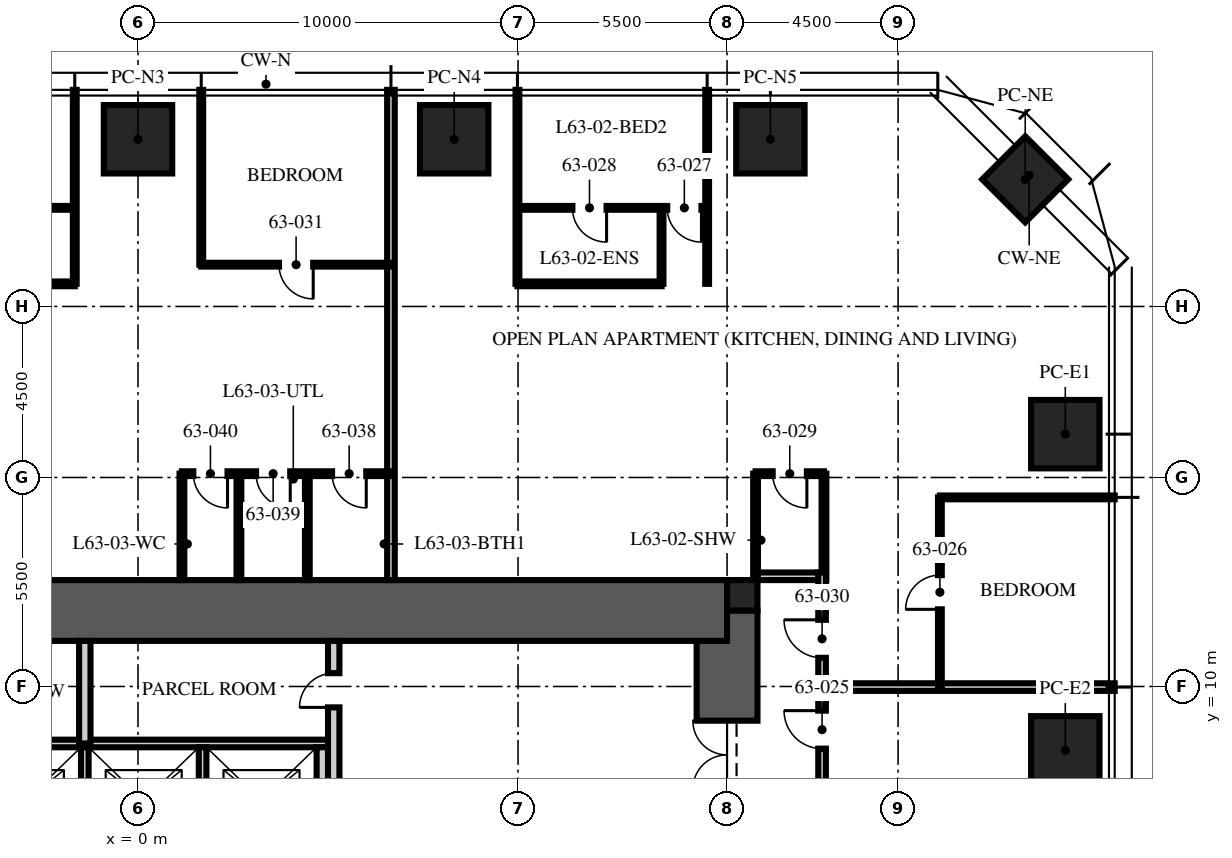
"""IFC4 building model, lengths in metres.
Left out: names, types, materials, properties, quantities, classifications, styles, units other than length and angle.
Written with IfcOpenShell. Run it as: python <this file> out.ifc"""

import sys

from ifc_helpers import new_model, si_unit, direction, frame, frame_2d, origin, origin_2d, place, context, subcontext, project, spatial, rectangle, extrude, element, fill, save


model = new_model("IFC4")
c1 = context("Model", 3, precision=1e-05, world=origin(), true_north=direction((0.0, 1.0)))
c2 = subcontext(c1, "Body", "Model", "MODEL_VIEW")
j1 = project(units=[si_unit("LENGTHUNIT", "METRE"), si_unit("PLANEANGLEUNIT", "RADIAN")], contexts=[c1])
p1 = place(None, origin())
s1 = spatial("IfcSite", under=j1, at=p1, CompositionType="ELEMENT")
p2 = place(p1, origin())
s2 = spatial("IfcBuilding", under=s1, at=p2, CompositionType="ELEMENT")
p3 = place(p2, frame((0.0, 0.0, 252.0)))
s3 = spatial("IfcBuildingStorey", under=s2, at=p3, CompositionType="ELEMENT", Elevation=252.0)
p4 = place(p3, frame((15.5, -12.0, -0.25), z_axis=(0.0, 0.0, 1.0), x_axis=(0.0, 1.0, 0.0)))
e1 = element("IfcWall", 1, at=p4, inside=s3, PredefinedType="SHEAR", context=c2, shape_type="SweptSolid", body=[
    extrude(rectangle(XDim=24.0, YDim=1.6, at=frame_2d((12.0, 0.0))), origin(), (0.0, 0.0, 1.0), 3.75),
])
p5 = place(p4, frame((3.2, 0.0, 0.25)))
e2 = element("IfcOpeningElement", 2, at=p5, cuts=e1, PredefinedType="OPENING", context=c2, shape_type="SweptSolid", body=[
    extrude(rectangle(XDim=1.2, YDim=2.1, at=frame_2d((0.6, 1.05))), frame((0.0, 0.81, 0.0), z_axis=(0.0, -1.0, 0.0), x_axis=(1.0, 0.0, 0.0)), (0.0, 0.0, 1.0), 1.62),
])
p6 = place(p4, frame((19.3, 0.0, 0.25)))
e3 = element("IfcOpeningElement", 3, at=p6, cuts=e1, PredefinedType="OPENING", context=c2, shape_type="SweptSolid", body=[
    extrude(rectangle(XDim=1.8, YDim=2.1, at=frame_2d((0.9, 1.05))), frame((0.0, 0.81, 0.0), z_axis=(0.0, -1.0, 0.0), x_axis=(1.0, 0.0, 0.0)), (0.0, 0.0, 1.0), 1.62),
])
p7 = place(p3, frame((-15.5, 12.0, -0.25), z_axis=(0.0, 0.0, 1.0), x_axis=(1.0, 0.0, 0.0)))
e4 = element("IfcWall", 4, at=p7, inside=s3, PredefinedType="SHEAR", context=c2, shape_type="SweptSolid", body=[
    extrude(rectangle(XDim=31.0, YDim=1.6, at=frame_2d((15.5, 0.0))), origin(), (0.0, 0.0, 1.0), 3.75),
])
p8 = place(p3, frame((15.9, 12.4, -0.25), z_axis=(0.0, 0.0, 1.0), x_axis=(1.0, 0.0, 0.0)))
e5 = element("IfcColumn", 5, at=p8, inside=s3, PredefinedType="COLUMN", context=c2, shape_type="SweptSolid", body=[
    extrude(rectangle(XDim=0.8, YDim=0.8, at=origin_2d()), origin(), (0.0, 0.0, 1.0), 3.75),
])
for number, where, z_axis, x_axis in (
    (6, (0.0, 24.4, 0.0), (0.0, 0.0, 1.0), (1.0, 0.0, 0.0)),
    (7, (8.32, 24.4, 0.0), (0.0, 0.0, 1.0), (1.0, 0.0, 0.0)),
    (8, (16.64, 24.4, 0.0), (0.0, 0.0, 1.0), (1.0, 0.0, 0.0)),
    (9, (24.4, 16.64, 0.0), (0.0, 0.0, 1.0), (0.0, 1.0, 0.0)),
    (10, (24.4, 8.32, 0.0), (0.0, 0.0, 1.0), (0.0, 1.0, 0.0)),
):
    element("IfcColumn", number, at=place(p3, frame(where, z_axis=z_axis, x_axis=x_axis)), inside=s3, PredefinedType="COLUMN", context=c2, shape_type="SweptSolid", body=[
        extrude(rectangle(XDim=1.8, YDim=1.8, at=origin_2d()), origin(), (0.0, 0.0, 1.0), 3.75),
    ])
p9 = place(p3, frame((23.346, 23.346, 0.0), z_axis=(0.0, 0.0, 1.0), x_axis=(0.707106781187, -0.707106781187, 0.0)))
e11 = element("IfcColumn", 11, at=p9, inside=s3, PredefinedType="COLUMN", context=c2, shape_type="SweptSolid", body=[
    extrude(rectangle(XDim=1.6, YDim=1.6, at=origin_2d()), origin(), (0.0, 0.0, 1.0), 3.75),
])
p10 = place(p3, frame((-4.7, 8.5, 0.0), z_axis=(0.0, 0.0, 1.0), x_axis=(1.0, 0.0, 0.0)))
e12 = element("IfcWall", 12, at=p10, inside=s3, PredefinedType="PARTITIONING", context=c2, shape_type="SweptSolid", body=[
    extrude(rectangle(XDim=9.7, YDim=0.2, at=frame_2d((4.85, 0.0))), origin(), (0.0, 0.0, 1.0), 3.5),
])
p11 = place(p3, frame((4.85, 5.6, 0.0), z_axis=(0.0, 0.0, 1.0), x_axis=(0.0, 1.0, 0.0)))
e13 = element("IfcWall", 13, at=p11, inside=s3, PredefinedType="PARTITIONING", context=c2, shape_type="SweptSolid", body=[
    extrude(rectangle(XDim=2.8, YDim=0.3, at=frame_2d((1.4, 0.0))), origin(), (0.0, 0.0, 1.0), 3.5),
])
for number, where, z_axis, x_axis in (
    (14, (-1.4, 5.6, 0.0), (0.0, 0.0, 1.0), (0.0, 1.0, 0.0)),
    (15, (1.7, 5.6, 0.0), (0.0, 0.0, 1.0), (0.0, 1.0, 0.0)),
):
    element("IfcWall", number, at=place(p3, frame(where, z_axis=z_axis, x_axis=x_axis)), inside=s3, PredefinedType="PARTITIONING", context=c2, shape_type="SweptSolid", body=[
        extrude(rectangle(XDim=2.8, YDim=0.2, at=frame_2d((1.4, 0.0))), origin(), (0.0, 0.0, 1.0), 3.5),
    ])
p12 = place(p3, frame((5.15, 5.3, 0.0), z_axis=(0.0, 0.0, 1.0), x_axis=(0.0, 1.0, 0.0)))
e16 = element("IfcWall", 16, at=p12, inside=s3, PredefinedType="PARTITIONING", context=c2, shape_type="SweptSolid", body=[
    extrude(rectangle(XDim=5.9, YDim=0.3, at=frame_2d((2.95, 0.0))), origin(), (0.0, 0.0, 1.0), 3.5),
])
p13 = place(p12, frame((4.15, 0.0, 0.0)))
e17 = element("IfcOpeningElement", 17, at=p13, cuts=e16, PredefinedType="OPENING", context=c2, shape_type="SweptSolid", body=[
    extrude(rectangle(XDim=0.9, YDim=2.1, at=frame_2d((0.45, 1.05))), frame((0.0, 0.16, 0.0), z_axis=(0.0, -1.0, 0.0), x_axis=(1.0, 0.0, 0.0)), (0.0, 0.0, 1.0), 0.32),
])
p14 = place(p3, frame((-1.4, 8.5, 0.0), z_axis=(0.0, 0.0, 1.0), x_axis=(0.0, 1.0, 0.0)))
e18 = element("IfcWall", 18, at=p14, inside=s3, PredefinedType="PARTITIONING", context=c2, shape_type="SweptSolid", body=[
    extrude(rectangle(XDim=2.7, YDim=0.3, at=frame_2d((1.35, 0.0))), origin(), (0.0, 0.0, 1.0), 3.5),
])
p15 = place(p3, frame((16.3, 12.9, 0.0), z_axis=(0.0, 0.0, 1.0), x_axis=(1.0, 0.0, 0.0)))
e19 = element("IfcWall", 19, at=p15, inside=s3, PredefinedType="PARTITIONING", context=c2, shape_type="SweptSolid", body=[
    extrude(rectangle(XDim=1.6, YDim=0.2, at=frame_2d((0.8, 0.0))), origin(), (0.0, 0.0, 1.0), 2.3),
])
p16 = place(p3, frame((18.1, 9.984, 0.0), z_axis=(0.0, 0.0, 1.0), x_axis=(1.0, 0.0, 0.0)))
e20 = element("IfcWall", 20, at=p16, inside=s3, PredefinedType="PARTITIONING", context=c2, shape_type="SweptSolid", body=[
    extrude(rectangle(XDim=7.6, YDim=0.2, at=frame_2d((3.8, 0.0))), origin(), (0.0, 0.0, 1.0), 2.91),
])
p17 = place(p3, frame((21.1, 14.976, 0.0), z_axis=(0.0, 0.0, 1.0), x_axis=(1.0, 0.0, 0.0)))
e21 = element("IfcWall", 21, at=p17, inside=s3, PredefinedType="PARTITIONING", context=c2, shape_type="SweptSolid", body=[
    extrude(rectangle(XDim=4.6, YDim=0.1, at=frame_2d((2.3, 0.0))), origin(), (0.0, 0.0, 1.0), 2.91),
])
for number, where, z_axis, x_axis in (
    (22, (14.976, 20.595, 0.0), (0.0, 0.0, 1.0), (0.0, 1.0, 0.0)),
    (23, (9.984, 20.595, 0.0), (0.0, 0.0, 1.0), (0.0, 1.0, 0.0)),
):
    element("IfcWall", number, at=place(p3, frame(where, z_axis=z_axis, x_axis=x_axis)), inside=s3, PredefinedType="PARTITIONING", context=c2, shape_type="SweptSolid", body=[
        extrude(rectangle(XDim=5.105, YDim=0.1, at=frame_2d((2.552, 0.0))), origin(), (0.0, 0.0, 1.0), 2.91),
    ])
p18 = place(p3, frame((6.656, 12.8, 0.0), z_axis=(0.0, 0.0, 1.0), x_axis=(0.0, 1.0, 0.0)))
e24 = element("IfcWall", 24, at=p18, inside=s3, PredefinedType="PARTITIONING", context=c2, shape_type="SweptSolid", body=[
    extrude(rectangle(XDim=12.9, YDim=0.2, at=frame_2d((6.45, 0.0))), origin(), (0.0, 0.0, 1.0), 2.91),
])
p19 = place(p3, frame((1.664, 21.1, 0.0), z_axis=(0.0, 0.0, 1.0), x_axis=(0.0, 1.0, 0.0)))
e25 = element("IfcWall", 25, at=p19, inside=s3, PredefinedType="PARTITIONING", context=c2, shape_type="SweptSolid", body=[
    extrude(rectangle(XDim=4.6, YDim=0.1, at=frame_2d((2.3, 0.0))), origin(), (0.0, 0.0, 1.0), 2.91),
])
p20 = place(p3, frame((-1.664, 20.595, 0.0), z_axis=(0.0, 0.0, 1.0), x_axis=(0.0, 1.0, 0.0)))
e26 = element("IfcWall", 26, at=p20, inside=s3, PredefinedType="PARTITIONING", context=c2, shape_type="SweptSolid", body=[
    extrude(rectangle(XDim=5.105, YDim=0.1, at=frame_2d((2.552, 0.0))), origin(), (0.0, 0.0, 1.0), 2.91),
])
p21 = place(p3, frame((21.1, 9.984, 0.0), z_axis=(0.0, 0.0, 1.0), x_axis=(0.0, 1.0, 0.0)))
e27 = element("IfcWall", 27, at=p21, inside=s3, PredefinedType="PARTITIONING", context=c2, shape_type="SweptSolid", body=[
    extrude(rectangle(XDim=4.992, YDim=0.1, at=frame_2d((2.496, 0.0))), origin(), (0.0, 0.0, 1.0), 2.81),
])
p22 = place(p21, frame((2.046, 0.0, 0.0)))
e28 = element("IfcOpeningElement", 28, at=p22, cuts=e27, PredefinedType="OPENING", context=c2, shape_type="SweptSolid", body=[
    extrude(rectangle(XDim=0.9, YDim=2.1, at=frame_2d((0.45, 1.05))), frame((0.0, 0.06, 0.0), z_axis=(0.0, -1.0, 0.0), x_axis=(1.0, 0.0, 0.0)), (0.0, 0.0, 1.0), 0.12),
])
p23 = place(p3, frame((14.976, 22.595, 0.0), z_axis=(0.0, 0.0, 1.0), x_axis=(-1.0, 0.0, 0.0)))
e29 = element("IfcWall", 29, at=p23, inside=s3, PredefinedType="PARTITIONING", context=c2, shape_type="SweptSolid", body=[
    extrude(rectangle(XDim=4.992, YDim=0.1, at=frame_2d((2.496, 0.0))), origin(), (0.0, 0.0, 1.0), 2.81),
])
p24 = place(p23, frame((0.15, 0.0, 0.0)))
e30 = element("IfcOpeningElement", 30, at=p24, cuts=e29, PredefinedType="OPENING", context=c2, shape_type="SweptSolid", body=[
    extrude(rectangle(XDim=0.9, YDim=2.1, at=frame_2d((0.45, 1.05))), frame((0.0, 0.06, 0.0), z_axis=(0.0, -1.0, 0.0), x_axis=(1.0, 0.0, 0.0)), (0.0, 0.0, 1.0), 0.12),
])
p25 = place(p23, frame((2.646, 0.0, 0.0)))
e31 = element("IfcOpeningElement", 31, at=p25, cuts=e29, PredefinedType="OPENING", context=c2, shape_type="SweptSolid", body=[
    extrude(rectangle(XDim=0.9, YDim=2.1, at=frame_2d((0.45, 1.05))), frame((0.0, 0.06, 0.0), z_axis=(0.0, -1.0, 0.0), x_axis=(1.0, 0.0, 0.0)), (0.0, 0.0, 1.0), 0.12),
])
p26 = place(p3, frame((13.776, 20.595, 0.0), z_axis=(0.0, 0.0, 1.0), x_axis=(0.0, 1.0, 0.0)))
e32 = element("IfcWall", 32, at=p26, inside=s3, PredefinedType="PARTITIONING", context=c2, shape_type="SweptSolid", body=[
    extrude(rectangle(XDim=2.0, YDim=0.1, at=frame_2d((1.0, 0.0))), origin(), (0.0, 0.0, 1.0), 3.5),
])
p27 = place(p3, frame((13.776, 20.595, 0.0), z_axis=(0.0, 0.0, 1.0), x_axis=(-1.0, 0.0, 0.0)))
e33 = element("IfcWall", 33, at=p27, inside=s3, PredefinedType="PARTITIONING", context=c2, shape_type="SweptSolid", body=[
    extrude(rectangle(XDim=3.792, YDim=0.125, at=frame_2d((1.896, 0.0))), origin(), (0.0, 0.0, 1.0), 2.81),
])
p28 = place(p3, frame((18.05, 15.6, 0.0), z_axis=(0.0, 0.0, 1.0), x_axis=(-1.0, 0.0, 0.0)))
e34 = element("IfcWall", 34, at=p28, inside=s3, PredefinedType="PARTITIONING", context=c2, shape_type="SweptSolid", body=[
    extrude(rectangle(XDim=1.8, YDim=0.125, at=frame_2d((0.9, 0.0))), origin(), (0.0, 0.0, 1.0), 2.3),
])
p29 = place(p28, frame((0.45, 0.0, 0.0)))
e35 = element("IfcOpeningElement", 35, at=p29, cuts=e34, PredefinedType="OPENING", context=c2, shape_type="SweptSolid", body=[
    extrude(rectangle(XDim=0.9, YDim=2.1, at=frame_2d((0.45, 1.05))), frame((0.0, 0.073, 0.0), z_axis=(0.0, -1.0, 0.0), x_axis=(1.0, 0.0, 0.0)), (0.0, 0.0, 1.0), 0.145),
])
for number, where, z_axis, x_axis in (
    (36, (18.05, 12.8, 0.0), (0.0, 0.0, 1.0), (0.0, 1.0, 0.0)),
    (37, (16.25, 12.8, 0.0), (0.0, 0.0, 1.0), (0.0, 1.0, 0.0)),
):
    element("IfcWall", number, at=place(p3, frame(where, z_axis=z_axis, x_axis=x_axis)), inside=s3, PredefinedType="PARTITIONING", context=c2, shape_type="SweptSolid", body=[
        extrude(rectangle(XDim=2.8, YDim=0.125, at=frame_2d((1.4, 0.0))), origin(), (0.0, 0.0, 1.0), 2.3),
    ])
p30 = place(p3, frame((6.656, 21.1, 0.0), z_axis=(0.0, 0.0, 1.0), x_axis=(-1.0, 0.0, 0.0)))
e38 = element("IfcWall", 38, at=p30, inside=s3, PredefinedType="PARTITIONING", context=c2, shape_type="SweptSolid", body=[
    extrude(rectangle(XDim=4.992, YDim=0.1, at=frame_2d((2.496, 0.0))), origin(), (0.0, 0.0, 1.0), 2.81),
])
p31 = place(p30, frame((2.046, 0.0, 0.0)))
e39 = element("IfcOpeningElement", 39, at=p31, cuts=e38, PredefinedType="OPENING", context=c2, shape_type="SweptSolid", body=[
    extrude(rectangle(XDim=0.9, YDim=2.1, at=frame_2d((0.45, 1.05))), frame((0.0, 0.06, 0.0), z_axis=(0.0, -1.0, 0.0), x_axis=(1.0, 0.0, 0.0)), (0.0, 0.0, 1.0), 0.12),
])
p32 = place(p3, frame((-1.664, 22.595, 0.0), z_axis=(0.0, 0.0, 1.0), x_axis=(-1.0, 0.0, 0.0)))
e40 = element("IfcWall", 40, at=p32, inside=s3, PredefinedType="PARTITIONING", context=c2, shape_type="SweptSolid", body=[
    extrude(rectangle(XDim=4.992, YDim=0.1, at=frame_2d((2.496, 0.0))), origin(), (0.0, 0.0, 1.0), 2.81),
])
p33 = place(p32, frame((3.942, 0.0, 0.0)))
e41 = element("IfcOpeningElement", 41, at=p33, cuts=e40, PredefinedType="OPENING", context=c2, shape_type="SweptSolid", body=[
    extrude(rectangle(XDim=0.9, YDim=2.1, at=frame_2d((0.45, 1.05))), frame((0.0, 0.06, 0.0), z_axis=(0.0, -1.0, 0.0), x_axis=(1.0, 0.0, 0.0)), (0.0, 0.0, 1.0), 0.12),
])
p34 = place(p32, frame((1.446, 0.0, 0.0)))
e42 = element("IfcOpeningElement", 42, at=p34, cuts=e40, PredefinedType="OPENING", context=c2, shape_type="SweptSolid", body=[
    extrude(rectangle(XDim=0.9, YDim=2.1, at=frame_2d((0.45, 1.05))), frame((0.0, 0.06, 0.0), z_axis=(0.0, -1.0, 0.0), x_axis=(1.0, 0.0, 0.0)), (0.0, 0.0, 1.0), 0.12),
])
p35 = place(p3, frame((-1.664, 20.595, 0.0), z_axis=(0.0, 0.0, 1.0), x_axis=(-1.0, 0.0, 0.0)))
e43 = element("IfcWall", 43, at=p35, inside=s3, PredefinedType="PARTITIONING", context=c2, shape_type="SweptSolid", body=[
    extrude(rectangle(XDim=3.792, YDim=0.125, at=frame_2d((1.896, 0.0))), origin(), (0.0, 0.0, 1.0), 2.81),
])
p36 = place(p3, frame((6.656, 15.6, 0.0), z_axis=(0.0, 0.0, 1.0), x_axis=(-1.0, 0.0, 0.0)))
e44 = element("IfcWall", 44, at=p36, inside=s3, PredefinedType="PARTITIONING", context=c2, shape_type="SweptSolid", body=[
    extrude(rectangle(XDim=5.5, YDim=0.125, at=frame_2d((2.75, 0.0))), origin(), (0.0, 0.0, 1.0), 2.81),
])
p37 = place(p36, frame((0.65, 0.0, 0.0)))
e45 = element("IfcOpeningElement", 45, at=p37, cuts=e44, PredefinedType="OPENING", context=c2, shape_type="SweptSolid", body=[
    extrude(rectangle(XDim=0.9, YDim=2.1, at=frame_2d((0.45, 1.05))), frame((0.0, 0.073, 0.0), z_axis=(0.0, -1.0, 0.0), x_axis=(1.0, 0.0, 0.0)), (0.0, 0.0, 1.0), 0.145),
])
p38 = place(p36, frame((2.65, 0.0, 0.0)))
e46 = element("IfcOpeningElement", 46, at=p38, cuts=e44, PredefinedType="OPENING", context=c2, shape_type="SweptSolid", body=[
    extrude(rectangle(XDim=0.9, YDim=2.1, at=frame_2d((0.45, 1.05))), frame((0.0, 0.073, 0.0), z_axis=(0.0, -1.0, 0.0), x_axis=(1.0, 0.0, 0.0)), (0.0, 0.0, 1.0), 0.145),
])
p39 = place(p36, frame((4.3, 0.0, 0.0)))
e47 = element("IfcOpeningElement", 47, at=p39, cuts=e44, PredefinedType="OPENING", context=c2, shape_type="SweptSolid", body=[
    extrude(rectangle(XDim=0.9, YDim=2.1, at=frame_2d((0.45, 1.05))), frame((0.0, 0.073, 0.0), z_axis=(0.0, -1.0, 0.0), x_axis=(1.0, 0.0, 0.0)), (0.0, 0.0, 1.0), 0.145),
])
for number, where, z_axis, x_axis in (
    (48, (4.456, 12.8, 0.0), (0.0, 0.0, 1.0), (0.0, 1.0, 0.0)),
    (49, (2.656, 12.8, 0.0), (0.0, 0.0, 1.0), (0.0, 1.0, 0.0)),
    (50, (1.156, 12.8, 0.0), (0.0, 0.0, 1.0), (0.0, 1.0, 0.0)),
):
    element("IfcWall", number, at=place(p3, frame(where, z_axis=z_axis, x_axis=x_axis)), inside=s3, PredefinedType="PARTITIONING", context=c2, shape_type="SweptSolid", body=[
        extrude(rectangle(XDim=2.8, YDim=0.125, at=frame_2d((1.4, 0.0))), origin(), (0.0, 0.0, 1.0), 3.5),
    ])
p40 = place(p3, frame((18.0, -12.8, 0.0), z_axis=(0.0, 0.0, 1.0), x_axis=(0.0, 1.0, 0.0)))
e51 = element("IfcWall", 51, at=p40, inside=s3, PredefinedType="PARTITIONING", context=c2, shape_type="SweptSolid", body=[
    extrude(rectangle(XDim=25.8, YDim=0.2, at=frame_2d((12.9, 0.0))), origin(), (0.0, 0.0, 1.0), 2.6),
])
p41 = place(p40, frame((21.164, 0.0, 0.0)))
e52 = element("IfcOpeningElement", 52, at=p41, cuts=e51, PredefinedType="OPENING", context=c2, shape_type="SweptSolid", body=[
    extrude(rectangle(XDim=1.0, YDim=2.2, at=frame_2d((0.5, 1.1))), frame((0.0, 0.11, 0.0), z_axis=(0.0, -1.0, 0.0), x_axis=(1.0, 0.0, 0.0)), (0.0, 0.0, 1.0), 0.22),
])
p42 = place(p40, frame((23.554, 0.0, 0.0)))
e53 = element("IfcOpeningElement", 53, at=p42, cuts=e51, PredefinedType="OPENING", context=c2, shape_type="SweptSolid", body=[
    extrude(rectangle(XDim=1.0, YDim=2.2, at=frame_2d((0.5, 1.1))), frame((0.0, 0.11, 0.0), z_axis=(0.0, -1.0, 0.0), x_axis=(1.0, 0.0, 0.0)), (0.0, 0.0, 1.0), 0.22),
])
p43 = place(p40, frame((4.4, 0.0, 0.0)))
e54 = element("IfcOpeningElement", 54, at=p43, cuts=e51, PredefinedType="OPENING", context=c2, shape_type="SweptSolid", body=[
    extrude(rectangle(XDim=1.0, YDim=2.2, at=frame_2d((0.5, 1.1))), frame((0.0, 0.11, 0.0), z_axis=(0.0, -1.0, 0.0), x_axis=(1.0, 0.0, 0.0)), (0.0, 0.0, 1.0), 0.22),
])
p44 = place(p6, origin())
e55 = element("IfcDoor", 55, at=p44, inside=s3, OperationType="DOUBLE_DOOR_SINGLE_SWING", PredefinedType="DOOR", context=c2, shape_type="SweptSolid", body=[
    extrude(rectangle(XDim=1.8, YDim=2.1, at=frame_2d((0.9, 1.05))), frame((0.0, 0.025, 0.0), z_axis=(0.0, -1.0, 0.0), x_axis=(1.0, 0.0, 0.0)), (0.0, 0.0, 1.0), 0.05),
])
fill(e3, e55)
p45 = place(p13, origin())
e56 = element("IfcDoor", 56, at=p45, inside=s3, OperationType="SINGLE_SWING_LEFT", PredefinedType="DOOR", context=c2, shape_type="SweptSolid", body=[
    extrude(rectangle(XDim=0.9, YDim=2.1, at=frame_2d((0.45, 1.05))), frame((0.0, 0.025, 0.0), z_axis=(0.0, -1.0, 0.0), x_axis=(1.0, 0.0, 0.0)), (0.0, 0.0, 1.0), 0.05),
])
fill(e17, e56)
p46 = place(p41, origin())
e57 = element("IfcDoor", 57, at=p46, inside=s3, OperationType="SINGLE_SWING_RIGHT", PredefinedType="DOOR", context=c2, shape_type="SweptSolid", body=[
    extrude(rectangle(XDim=1.0, YDim=2.2, at=frame_2d((0.5, 1.1))), frame((0.0, 0.025, 0.0), z_axis=(0.0, -1.0, 0.0), x_axis=(1.0, 0.0, 0.0)), (0.0, 0.0, 1.0), 0.05),
])
fill(e52, e57)
p47 = place(p22, origin())
e58 = element("IfcDoor", 58, at=p47, inside=s3, OperationType="SINGLE_SWING_LEFT", PredefinedType="DOOR", context=c2, shape_type="SweptSolid", body=[
    extrude(rectangle(XDim=0.9, YDim=2.1, at=frame_2d((0.45, 1.05))), frame((0.0, 0.025, 0.0), z_axis=(0.0, -1.0, 0.0), x_axis=(1.0, 0.0, 0.0)), (0.0, 0.0, 1.0), 0.05),
])
fill(e28, e58)
p48 = place(p24, origin())
e59 = element("IfcDoor", 59, at=p48, inside=s3, OperationType="SINGLE_SWING_LEFT", PredefinedType="DOOR", context=c2, shape_type="SweptSolid", body=[
    extrude(rectangle(XDim=0.9, YDim=2.1, at=frame_2d((0.45, 1.05))), frame((0.0, 0.025, 0.0), z_axis=(0.0, -1.0, 0.0), x_axis=(1.0, 0.0, 0.0)), (0.0, 0.0, 1.0), 0.05),
])
fill(e30, e59)
p49 = place(p25, origin())
e60 = element("IfcDoor", 60, at=p49, inside=s3, OperationType="SINGLE_SWING_LEFT", PredefinedType="DOOR", context=c2, shape_type="SweptSolid", body=[
    extrude(rectangle(XDim=0.9, YDim=2.1, at=frame_2d((0.45, 1.05))), frame((0.0, 0.025, 0.0), z_axis=(0.0, -1.0, 0.0), x_axis=(1.0, 0.0, 0.0)), (0.0, 0.0, 1.0), 0.05),
])
fill(e31, e60)
p50 = place(p29, origin())
e61 = element("IfcDoor", 61, at=p50, inside=s3, OperationType="SINGLE_SWING_LEFT", PredefinedType="DOOR", context=c2, shape_type="SweptSolid", body=[
    extrude(rectangle(XDim=0.9, YDim=2.1, at=frame_2d((0.45, 1.05))), frame((0.0, 0.025, 0.0), z_axis=(0.0, -1.0, 0.0), x_axis=(1.0, 0.0, 0.0)), (0.0, 0.0, 1.0), 0.05),
])
fill(e35, e61)
p51 = place(p42, origin())
e62 = element("IfcDoor", 62, at=p51, inside=s3, OperationType="SINGLE_SWING_RIGHT", PredefinedType="DOOR", context=c2, shape_type="SweptSolid", body=[
    extrude(rectangle(XDim=1.0, YDim=2.2, at=frame_2d((0.5, 1.1))), frame((0.0, 0.025, 0.0), z_axis=(0.0, -1.0, 0.0), x_axis=(1.0, 0.0, 0.0)), (0.0, 0.0, 1.0), 0.05),
])
fill(e53, e62)
p52 = place(p31, origin())
e63 = element("IfcDoor", 63, at=p52, inside=s3, OperationType="SINGLE_SWING_LEFT", PredefinedType="DOOR", context=c2, shape_type="SweptSolid", body=[
    extrude(rectangle(XDim=0.9, YDim=2.1, at=frame_2d((0.45, 1.05))), frame((0.0, 0.025, 0.0), z_axis=(0.0, -1.0, 0.0), x_axis=(1.0, 0.0, 0.0)), (0.0, 0.0, 1.0), 0.05),
])
fill(e39, e63)
p53 = place(p37, origin())
e64 = element("IfcDoor", 64, at=p53, inside=s3, OperationType="SINGLE_SWING_LEFT", PredefinedType="DOOR", context=c2, shape_type="SweptSolid", body=[
    extrude(rectangle(XDim=0.9, YDim=2.1, at=frame_2d((0.45, 1.05))), frame((0.0, 0.025, 0.0), z_axis=(0.0, -1.0, 0.0), x_axis=(1.0, 0.0, 0.0)), (0.0, 0.0, 1.0), 0.05),
])
fill(e45, e64)
p54 = place(p38, origin())
e65 = element("IfcDoor", 65, at=p54, inside=s3, OperationType="SINGLE_SWING_LEFT", PredefinedType="DOOR", context=c2, shape_type="SweptSolid", body=[
    extrude(rectangle(XDim=0.9, YDim=2.1, at=frame_2d((0.45, 1.05))), frame((0.0, 0.025, 0.0), z_axis=(0.0, -1.0, 0.0), x_axis=(1.0, 0.0, 0.0)), (0.0, 0.0, 1.0), 0.05),
])
fill(e46, e65)
p55 = place(p39, origin())
e66 = element("IfcDoor", 66, at=p55, inside=s3, OperationType="SINGLE_SWING_LEFT", PredefinedType="DOOR", context=c2, shape_type="SweptSolid", body=[
    extrude(rectangle(XDim=0.9, YDim=2.1, at=frame_2d((0.45, 1.05))), frame((0.0, 0.025, 0.0), z_axis=(0.0, -1.0, 0.0), x_axis=(1.0, 0.0, 0.0)), (0.0, 0.0, 1.0), 0.05),
])
fill(e47, e66)
save(model, sys.argv[1])
